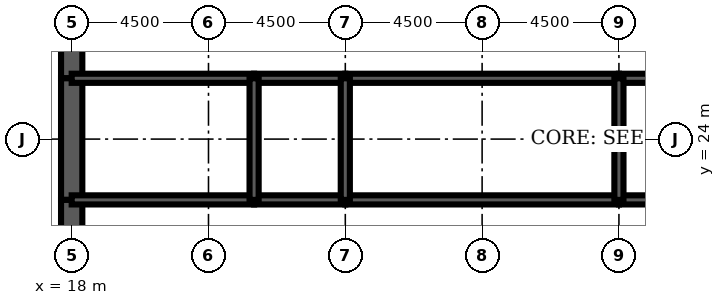
"""IFC4 building model, lengths in metres.
Left out: names, types, materials, properties, quantities, classifications, styles, units other than length and angle.
Written with IfcOpenShell. Run it as: python <this file> out.ifc"""

import sys

from ifc_helpers import new_model, si_unit, direction, frame, frame_2d, origin, place, context, subcontext, project, spatial, rectangle, extrude, element, fill, save


model = new_model("IFC4")
c1 = context("Model", 3, precision=1e-05, world=origin(), true_north=direction((0.0, 1.0)))
c2 = subcontext(c1, "Body", "Model", "MODEL_VIEW")
j1 = project(units=[si_unit("LENGTHUNIT", "METRE"), si_unit("PLANEANGLEUNIT", "RADIAN")], contexts=[c1])
p1 = place(None, origin())
s1 = spatial("IfcSite", under=j1, at=p1, CompositionType="ELEMENT")
p2 = place(p1, origin())
s2 = spatial("IfcBuilding", under=s1, at=p2, CompositionType="ELEMENT")
p3 = place(p2, frame((0.0, 0.0, 300.5)))
s3 = spatial("IfcBuildingStorey", under=s2, at=p3, CompositionType="ELEMENT", Elevation=300.5)
p4 = place(p3, frame((18.0, 28.8, 0.0), z_axis=(0.0, 0.0, 1.0), x_axis=(0.0, -1.0, 0.0)))
e1 = element("IfcWall", 1, at=p4, inside=s3, PredefinedType="SHEAR", context=c2, shape_type="SweptSolid", body=[
    extrude(rectangle(XDim=2.8, YDim=0.7, at=frame_2d((1.4, 0.0))), origin(), (0.0, 0.0, 1.0), 4.2),
])
p5 = place(p4, frame((0.4, 0.0, 0.0)))
e2 = element("IfcOpeningElement", 2, at=p5, cuts=e1, PredefinedType="OPENING", context=c2, shape_type="SweptSolid", body=[
    extrude(rectangle(XDim=1.8, YDim=2.1, at=frame_2d((0.9, 1.05))), frame((0.0, 0.36, 0.0), z_axis=(0.0, -1.0, 0.0), x_axis=(1.0, 0.0, 0.0)), (0.0, 0.0, 1.0), 0.72),
])
p6 = place(p3, frame((18.0, 26.0, 0.0), z_axis=(0.0, 0.0, 1.0), x_axis=(0.0, -1.0, 0.0)))
e3 = element("IfcWall", 3, at=p6, inside=s3, PredefinedType="SHEAR", context=c2, shape_type="SweptSolid", body=[
    extrude(rectangle(XDim=4.0, YDim=0.7, at=frame_2d((2.0, 0.0))), origin(), (0.0, 0.0, 1.0), 4.2),
])
p7 = place(p3, frame((18.0, 22.0, 0.0), z_axis=(0.0, 0.0, 1.0), x_axis=(0.0, -1.0, 0.0)))
e4 = element("IfcWall", 4, at=p7, inside=s3, PredefinedType="SHEAR", context=c2, shape_type="SweptSolid", body=[
    extrude(rectangle(XDim=2.8, YDim=0.7, at=frame_2d((1.4, 0.0))), origin(), (0.0, 0.0, 1.0), 4.2),
])
p8 = place(p7, frame((0.6, 0.0, 0.0)))
e5 = element("IfcOpeningElement", 5, at=p8, cuts=e4, PredefinedType="OPENING", context=c2, shape_type="SweptSolid", body=[
    extrude(rectangle(XDim=1.8, YDim=2.1, at=frame_2d((0.9, 1.05))), frame((0.0, 0.36, 0.0), z_axis=(0.0, -1.0, 0.0), x_axis=(1.0, 0.0, 0.0)), (0.0, 0.0, 1.0), 0.72),
])
p9 = place(p3, frame((18.0, 22.0, 0.0), z_axis=(0.0, 0.0, 1.0), x_axis=(1.0, 0.0, 0.0)))
e6 = element("IfcWall", 6, at=p9, inside=s3, PredefinedType="SOLIDWALL", context=c2, shape_type="SweptSolid", body=[
    extrude(rectangle(XDim=6.0, YDim=0.3, at=frame_2d((3.0, 0.0))), origin(), (0.0, 0.0, 1.0), 4.2),
])
p10 = place(p9, frame((4.4, 0.0, 0.0)))
e7 = element("IfcOpeningElement", 7, at=p10, cuts=e6, PredefinedType="OPENING", context=c2, shape_type="SweptSolid", body=[
    extrude(rectangle(XDim=1.0, YDim=2.1, at=frame_2d((0.5, 1.05))), frame((0.0, 0.16, 0.0), z_axis=(0.0, -1.0, 0.0), x_axis=(1.0, 0.0, 0.0)), (0.0, 0.0, 1.0), 0.32),
])
p11 = place(p9, frame((0.75, 0.0, 0.0)))
e8 = element("IfcOpeningElement", 8, at=p11, cuts=e6, PredefinedType="OPENING", context=c2, shape_type="SweptSolid", body=[
    extrude(rectangle(XDim=1.0, YDim=2.1, at=frame_2d((0.5, 1.05))), frame((0.0, 0.16, 0.0), z_axis=(0.0, -1.0, 0.0), x_axis=(1.0, 0.0, 0.0)), (0.0, 0.0, 1.0), 0.32),
])
p12 = place(p3, frame((24.0, 22.0, 0.0), z_axis=(0.0, 0.0, 1.0), x_axis=(1.0, 0.0, 0.0)))
e9 = element("IfcWall", 9, at=p12, inside=s3, PredefinedType="SOLIDWALL", context=c2, shape_type="SweptSolid", body=[
    extrude(rectangle(XDim=3.0, YDim=0.3, at=frame_2d((1.5, 0.0))), origin(), (0.0, 0.0, 1.0), 4.2),
])
p13 = place(p12, frame((1.0, 0.0, 0.0)))
e10 = element("IfcOpeningElement", 10, at=p13, cuts=e9, PredefinedType="OPENING", context=c2, shape_type="SweptSolid", body=[
    extrude(rectangle(XDim=1.0, YDim=2.1, at=frame_2d((0.5, 1.05))), frame((0.0, 0.16, 0.0), z_axis=(0.0, -1.0, 0.0), x_axis=(1.0, 0.0, 0.0)), (0.0, 0.0, 1.0), 0.32),
])
p14 = place(p3, frame((27.0, 22.0, 0.0), z_axis=(0.0, 0.0, 1.0), x_axis=(1.0, 0.0, 0.0)))
e11 = element("IfcWall", 11, at=p14, inside=s3, PredefinedType="SOLIDWALL", context=c2, shape_type="SweptSolid", body=[
    extrude(rectangle(XDim=9.0, YDim=0.3, at=frame_2d((4.5, 0.0))), origin(), (0.0, 0.0, 1.0), 4.2),
])
p15 = place(p14, frame((4.0, 0.0, 0.0)))
e12 = element("IfcOpeningElement", 12, at=p15, cuts=e11, PredefinedType="OPENING", context=c2, shape_type="SweptSolid", body=[
    extrude(rectangle(XDim=1.0, YDim=2.1, at=frame_2d((0.5, 1.05))), frame((0.0, 0.16, 0.0), z_axis=(0.0, -1.0, 0.0), x_axis=(1.0, 0.0, 0.0)), (0.0, 0.0, 1.0), 0.32),
])
p16 = place(p3, frame((36.0, 22.0, 0.0), z_axis=(0.0, 0.0, 1.0), x_axis=(1.0, 0.0, 0.0)))
e13 = element("IfcWall", 13, at=p16, inside=s3, PredefinedType="SOLIDWALL", context=c2, shape_type="SweptSolid", body=[
    extrude(rectangle(XDim=9.0, YDim=0.3, at=frame_2d((4.5, 0.0))), origin(), (0.0, 0.0, 1.0), 4.2),
])
p17 = place(p16, frame((4.0, 0.0, 0.0)))
e14 = element("IfcOpeningElement", 14, at=p17, cuts=e13, PredefinedType="OPENING", context=c2, shape_type="SweptSolid", body=[
    extrude(rectangle(XDim=1.0, YDim=2.1, at=frame_2d((0.5, 1.05))), frame((0.0, 0.16, 0.0), z_axis=(0.0, -1.0, 0.0), x_axis=(1.0, 0.0, 0.0)), (0.0, 0.0, 1.0), 0.32),
])
p18 = place(p3, frame((18.0, 26.0, 0.0), z_axis=(0.0, 0.0, 1.0), x_axis=(1.0, 0.0, 0.0)))
e15 = element("IfcWall", 15, at=p18, inside=s3, PredefinedType="SOLIDWALL", context=c2, shape_type="SweptSolid", body=[
    extrude(rectangle(XDim=6.0, YDim=0.3, at=frame_2d((3.0, 0.0))), origin(), (0.0, 0.0, 1.0), 4.2),
])
p19 = place(p3, frame((24.0, 26.0, 0.0), z_axis=(0.0, 0.0, 1.0), x_axis=(1.0, 0.0, 0.0)))
e16 = element("IfcWall", 16, at=p19, inside=s3, PredefinedType="SOLIDWALL", context=c2, shape_type="SweptSolid", body=[
    extrude(rectangle(XDim=3.0, YDim=0.3, at=frame_2d((1.5, 0.0))), origin(), (0.0, 0.0, 1.0), 4.2),
])
for number, where, z_axis, x_axis in (
    (17, (27.0, 26.0, 0.0), (0.0, 0.0, 1.0), (1.0, 0.0, 0.0)),
    (18, (36.0, 26.0, 0.0), (0.0, 0.0, 1.0), (1.0, 0.0, 0.0)),
):
    element("IfcWall", number, at=place(p3, frame(where, z_axis=z_axis, x_axis=x_axis)), inside=s3, PredefinedType="SOLIDWALL", context=c2, shape_type="SweptSolid", body=[
        extrude(rectangle(XDim=9.0, YDim=0.3, at=frame_2d((4.5, 0.0))), origin(), (0.0, 0.0, 1.0), 4.2),
    ])
for number, where, z_axis, x_axis in (
    (19, (24.0, 22.0, 0.0), (0.0, 0.0, 1.0), (0.0, 1.0, 0.0)),
    (20, (27.0, 22.0, 0.0), (0.0, 0.0, 1.0), (0.0, 1.0, 0.0)),
    (21, (36.0, 22.0, 0.0), (0.0, 0.0, 1.0), (0.0, 1.0, 0.0)),
):
    element("IfcWall", number, at=place(p3, frame(where, z_axis=z_axis, x_axis=x_axis)), inside=s3, PredefinedType="SOLIDWALL", context=c2, shape_type="SweptSolid", body=[
        extrude(rectangle(XDim=4.0, YDim=0.3, at=frame_2d((2.0, 0.0))), origin(), (0.0, 0.0, 1.0), 4.2),
    ])
p20 = place(p3, frame((20.225, 22.15, 0.0), z_axis=(0.0, 0.0, 1.0), x_axis=(0.0, 1.0, 0.0)))
e22 = element("IfcWall", 22, at=p20, inside=s3, PredefinedType="PARTITIONING", context=c2, shape_type="SweptSolid", body=[
    extrude(rectangle(XDim=3.7, YDim=0.15, at=frame_2d((1.85, 0.0))), origin(), (0.0, 0.0, 1.0), 3.0),
])
p21 = place(p8, origin())
e23 = element("IfcDoor", 23, at=p21, inside=s3, OperationType="SINGLE_SWING_LEFT", PredefinedType="DOOR", context=c2, shape_type="SweptSolid", body=[
    extrude(rectangle(XDim=1.8, YDim=2.1, at=frame_2d((0.9, 1.05))), frame((0.0, 0.35, 0.0), z_axis=(0.0, -1.0, 0.0), x_axis=(1.0, 0.0, 0.0)), (0.0, 0.0, 1.0), 0.699),
])
fill(e5, e23)
p22 = place(p5, origin())
e24 = element("IfcDoor", 24, at=p22, inside=s3, OperationType="SINGLE_SWING_LEFT", PredefinedType="DOOR", context=c2, shape_type="SweptSolid", body=[
    extrude(rectangle(XDim=1.8, YDim=2.1, at=frame_2d((0.9, 1.05))), frame((0.0, 0.35, 0.0), z_axis=(0.0, -1.0, 0.0), x_axis=(1.0, 0.0, 0.0)), (0.0, 0.0, 1.0), 0.699),
])
fill(e2, e24)
p23 = place(p10, origin())
e25 = element("IfcDoor", 25, at=p23, inside=s3, OperationType="SINGLE_SWING_RIGHT", PredefinedType="DOOR", context=c2, shape_type="SweptSolid", body=[
    extrude(rectangle(XDim=1.0, YDim=2.1, at=frame_2d((0.5, 1.05))), frame((0.0, 0.025, 0.0), z_axis=(0.0, -1.0, 0.0), x_axis=(1.0, 0.0, 0.0)), (0.0, 0.0, 1.0), 0.05),
])
fill(e7, e25)
p24 = place(p13, origin())
e26 = element("IfcDoor", 26, at=p24, inside=s3, OperationType="SINGLE_SWING_LEFT", PredefinedType="DOOR", context=c2, shape_type="SweptSolid", body=[
    extrude(rectangle(XDim=1.0, YDim=2.1, at=frame_2d((0.5, 1.05))), frame((0.0, 0.025, 0.0), z_axis=(0.0, -1.0, 0.0), x_axis=(1.0, 0.0, 0.0)), (0.0, 0.0, 1.0), 0.05),
])
fill(e10, e26)
p25 = place(p15, origin())
e27 = element("IfcDoor", 27, at=p25, inside=s3, OperationType="SINGLE_SWING_LEFT", PredefinedType="DOOR", context=c2, shape_type="SweptSolid", body=[
    extrude(rectangle(XDim=1.0, YDim=2.1, at=frame_2d((0.5, 1.05))), frame((0.0, 0.025, 0.0), z_axis=(0.0, -1.0, 0.0), x_axis=(1.0, 0.0, 0.0)), (0.0, 0.0, 1.0), 0.05),
])
fill(e12, e27)
p26 = place(p11, origin())
e28 = element("IfcDoor", 28, at=p26, inside=s3, OperationType="SINGLE_SWING_LEFT", PredefinedType="DOOR", context=c2, shape_type="SweptSolid", body=[
    extrude(rectangle(XDim=1.0, YDim=2.1, at=frame_2d((0.5, 1.05))), frame((0.0, 0.025, 0.0), z_axis=(0.0, -1.0, 0.0), x_axis=(1.0, 0.0, 0.0)), (0.0, 0.0, 1.0), 0.05),
])
fill(e8, e28)
save(model, sys.argv[1])
